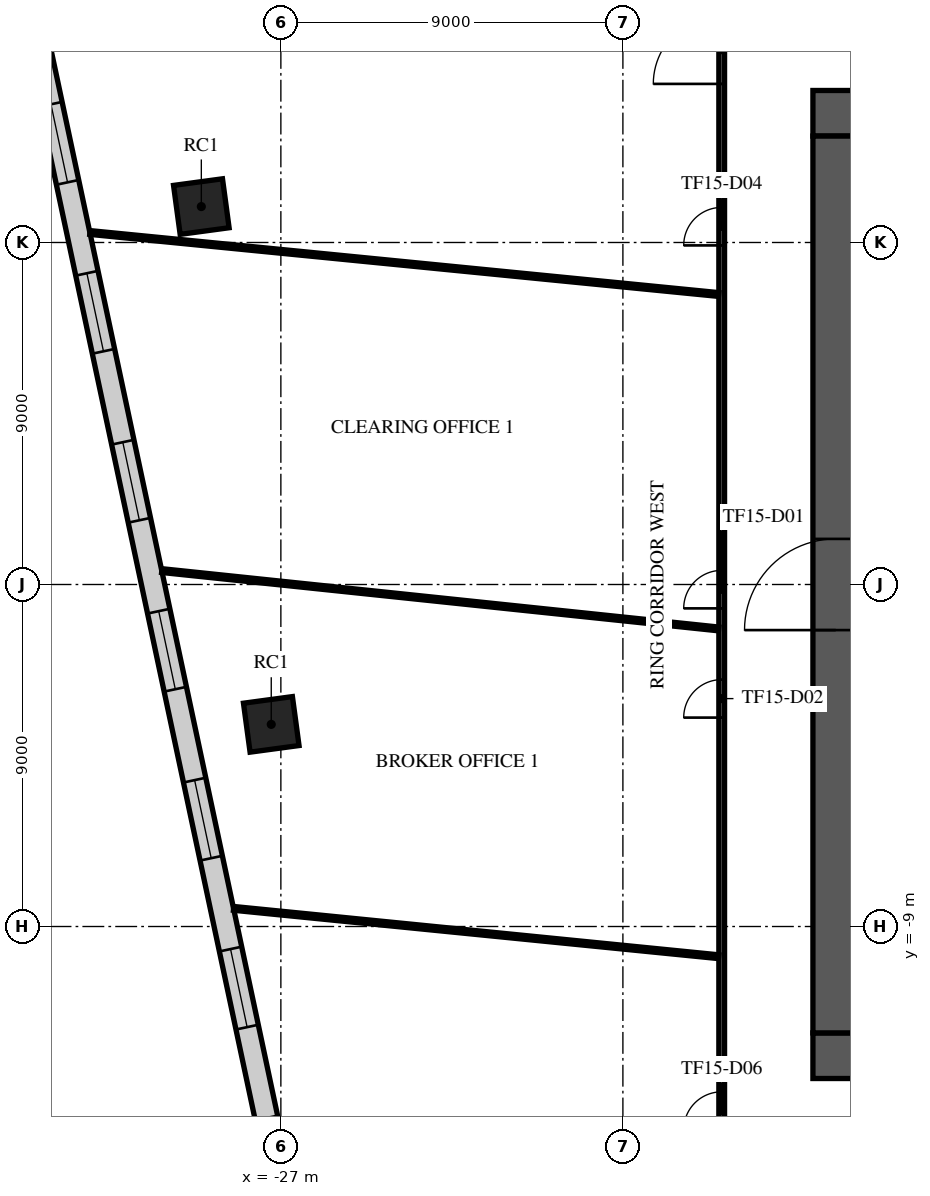
"""IFC4 building model, lengths in metres.
Left out: names, types, materials, properties, quantities, classifications, styles, units other than length and angle.
Written with IfcOpenShell. Run it as: python <this file> out.ifc"""

import sys

from ifc_helpers import new_model, si_unit, direction, frame, frame_2d, origin, origin_2d, place, context, subcontext, project, spatial, rectangle, extrude, element, fill, save


model = new_model("IFC4")
c1 = context("Model", 3, precision=1e-05, world=origin(), true_north=direction((0.0, 1.0)))
c2 = subcontext(c1, "Body", "Model", "MODEL_VIEW")
j1 = project(units=[si_unit("LENGTHUNIT", "METRE"), si_unit("PLANEANGLEUNIT", "RADIAN")], contexts=[c1])
p1 = place(None, origin())
s1 = spatial("IfcSite", under=j1, at=p1, CompositionType="ELEMENT")
p2 = place(p1, origin())
s2 = spatial("IfcBuilding", under=s1, at=p2, CompositionType="ELEMENT")
p3 = place(p2, frame((0.0, 0.0, 68.1)))
s3 = spatial("IfcBuildingStorey", under=s2, at=p3, CompositionType="ELEMENT", Elevation=68.1)
for number, where, z_axis, x_axis in (
    (1, (-29.093, 9.945, 0.0), (0.0, 0.0, 1.0), (0.991, 0.134, 0.0)),
    (2, (-27.253, -3.681, 0.0), (0.0, 0.0, 1.0), (0.991, 0.134, 0.0)),
):
    element("IfcColumn", number, at=place(p3, frame(where, z_axis=z_axis, x_axis=x_axis)), inside=s3, PredefinedType="COLUMN", context=c2, shape_type="SweptSolid", body=[
        extrude(rectangle(XDim=1.3, YDim=1.3, at=origin_2d()), origin(), (0.0, 0.0, 1.0), 4.2),
    ])
p4 = place(p3, frame((-13.0, 12.4, 0.0), z_axis=(0.0, 0.0, 1.0), x_axis=(1.0, 0.0, 0.0)))
e3 = element("IfcWall", 3, at=p4, inside=s3, PredefinedType="SHEAR", context=c2, shape_type="SweptSolid", body=[
    extrude(rectangle(XDim=26.0, YDim=1.2, at=frame_2d((13.0, 0.0))), origin(), (0.0, 0.0, 1.0), 3.75),
])
p5 = place(p4, frame((11.8, 0.0, 0.0)))
e4 = element("IfcOpeningElement", 4, at=p5, cuts=e3, PredefinedType="OPENING", context=c2, shape_type="SweptSolid", body=[
    extrude(rectangle(XDim=2.4, YDim=2.4, at=frame_2d((1.2, 1.2))), frame((0.0, 0.61, 0.0), z_axis=(0.0, -1.0, 0.0), x_axis=(1.0, 0.0, 0.0)), (0.0, 0.0, 1.0), 1.22),
])
p6 = place(p4, frame((22.625, 0.0, 0.0)))
e5 = element("IfcOpeningElement", 5, at=p6, cuts=e3, PredefinedType="OPENING", context=c2, shape_type="SweptSolid", body=[
    extrude(rectangle(XDim=1.2, YDim=2.1, at=frame_2d((0.6, 1.05))), frame((0.0, 0.61, 0.0), z_axis=(0.0, -1.0, 0.0), x_axis=(1.0, 0.0, 0.0)), (0.0, 0.0, 1.0), 1.22),
])
p7 = place(p4, frame((1.6, 0.0, 0.0)))
e6 = element("IfcOpeningElement", 6, at=p7, cuts=e3, PredefinedType="OPENING", context=c2, shape_type="SweptSolid", body=[
    extrude(rectangle(XDim=1.0, YDim=2.1, at=frame_2d((0.5, 1.05))), frame((0.0, 0.61, 0.0), z_axis=(0.0, -1.0, 0.0), x_axis=(1.0, 0.0, 0.0)), (0.0, 0.0, 1.0), 1.22),
])
p8 = place(p3, frame((-13.0, -12.4, 0.0), z_axis=(0.0, 0.0, 1.0), x_axis=(1.0, 0.0, 0.0)))
e7 = element("IfcWall", 7, at=p8, inside=s3, PredefinedType="SHEAR", context=c2, shape_type="SweptSolid", body=[
    extrude(rectangle(XDim=26.0, YDim=1.2, at=frame_2d((13.0, 0.0))), origin(), (0.0, 0.0, 1.0), 3.75),
])
p9 = place(p8, frame((7.9, 0.0, 0.0)))
e8 = element("IfcOpeningElement", 8, at=p9, cuts=e7, PredefinedType="OPENING", context=c2, shape_type="SweptSolid", body=[
    extrude(rectangle(XDim=2.0, YDim=2.1, at=frame_2d((1.0, 1.05))), frame((0.0, 0.61, 0.0), z_axis=(0.0, -1.0, 0.0), x_axis=(1.0, 0.0, 0.0)), (0.0, 0.0, 1.0), 1.22),
])
p10 = place(p8, frame((18.025, 0.0, 0.0)))
e9 = element("IfcOpeningElement", 9, at=p10, cuts=e7, PredefinedType="OPENING", context=c2, shape_type="SweptSolid", body=[
    extrude(rectangle(XDim=1.2, YDim=2.1, at=frame_2d((0.6, 1.05))), frame((0.0, 0.61, 0.0), z_axis=(0.0, -1.0, 0.0), x_axis=(1.0, 0.0, 0.0)), (0.0, 0.0, 1.0), 1.22),
])
p11 = place(p8, frame((2.175, 0.0, 0.0)))
e10 = element("IfcOpeningElement", 10, at=p11, cuts=e7, PredefinedType="OPENING", context=c2, shape_type="SweptSolid", body=[
    extrude(rectangle(XDim=1.2, YDim=2.1, at=frame_2d((0.6, 1.05))), frame((0.0, 0.61, 0.0), z_axis=(0.0, -1.0, 0.0), x_axis=(1.0, 0.0, 0.0)), (0.0, 0.0, 1.0), 1.22),
])
p12 = place(p8, frame((22.625, 0.0, 0.0)))
e11 = element("IfcOpeningElement", 11, at=p12, cuts=e7, PredefinedType="OPENING", context=c2, shape_type="SweptSolid", body=[
    extrude(rectangle(XDim=1.2, YDim=2.1, at=frame_2d((0.6, 1.05))), frame((0.0, 0.61, 0.0), z_axis=(0.0, -1.0, 0.0), x_axis=(1.0, 0.0, 0.0)), (0.0, 0.0, 1.0), 1.22),
])
p13 = place(p3, frame((-12.4, -11.8, 0.0), z_axis=(0.0, 0.0, 1.0), x_axis=(0.0, 1.0, 0.0)))
e12 = element("IfcWall", 12, at=p13, inside=s3, PredefinedType="SHEAR", context=c2, shape_type="SweptSolid", body=[
    extrude(rectangle(XDim=23.6, YDim=1.2, at=frame_2d((11.8, 0.0))), origin(), (0.0, 0.0, 1.0), 3.75),
])
p14 = place(p13, frame((10.6, 0.0, 0.0)))
e13 = element("IfcOpeningElement", 13, at=p14, cuts=e12, PredefinedType="OPENING", context=c2, shape_type="SweptSolid", body=[
    extrude(rectangle(XDim=2.4, YDim=2.4, at=frame_2d((1.2, 1.2))), frame((0.0, 0.61, 0.0), z_axis=(0.0, -1.0, 0.0), x_axis=(1.0, 0.0, 0.0)), (0.0, 0.0, 1.0), 1.22),
])
p15 = place(p3, frame((-34.223, 18.157, 0.0), z_axis=(0.0, 0.0, 1.0), x_axis=(0.207913160934, -0.97814728825, 0.0)))
e14 = element("IfcWall", 14, at=p15, inside=s3, PredefinedType="STANDARD", context=c2, shape_type="SweptSolid", body=[
    extrude(rectangle(XDim=49.751, YDim=0.6, at=frame_2d((24.876, 0.0))), origin(), (0.0, 0.0, 1.0), 3.75),
])
p16 = place(p15, frame((1.161, 0.0, 0.9)))
e15 = element("IfcOpeningElement", 15, at=p16, cuts=e14, PredefinedType="OPENING", context=c2, shape_type="SweptSolid", body=[
    extrude(rectangle(XDim=2.1, YDim=2.1, at=frame_2d((1.05, 1.05))), frame((0.0, 0.31, 0.0), z_axis=(0.0, -1.0, 0.0), x_axis=(1.0, 0.0, 0.0)), (0.0, 0.0, 1.0), 0.62),
])
p17 = place(p15, frame((5.644, 0.0, 0.9)))
e16 = element("IfcOpeningElement", 16, at=p17, cuts=e14, PredefinedType="OPENING", context=c2, shape_type="SweptSolid", body=[
    extrude(rectangle(XDim=2.1, YDim=2.1, at=frame_2d((1.05, 1.05))), frame((0.0, 0.31, 0.0), z_axis=(0.0, -1.0, 0.0), x_axis=(1.0, 0.0, 0.0)), (0.0, 0.0, 1.0), 0.62),
])
p18 = place(p15, frame((10.189, 0.0, 0.9)))
e17 = element("IfcOpeningElement", 17, at=p18, cuts=e14, PredefinedType="OPENING", context=c2, shape_type="SweptSolid", body=[
    extrude(rectangle(XDim=2.1, YDim=2.1, at=frame_2d((1.05, 1.05))), frame((0.0, 0.31, 0.0), z_axis=(0.0, -1.0, 0.0), x_axis=(1.0, 0.0, 0.0)), (0.0, 0.0, 1.0), 0.62),
])
p19 = place(p15, frame((14.735, 0.0, 0.9)))
e18 = element("IfcOpeningElement", 18, at=p19, cuts=e14, PredefinedType="OPENING", context=c2, shape_type="SweptSolid", body=[
    extrude(rectangle(XDim=2.1, YDim=2.1, at=frame_2d((1.05, 1.05))), frame((0.0, 0.31, 0.0), z_axis=(0.0, -1.0, 0.0), x_axis=(1.0, 0.0, 0.0)), (0.0, 0.0, 1.0), 0.62),
])
p20 = place(p15, frame((19.28, 0.0, 0.9)))
e19 = element("IfcOpeningElement", 19, at=p20, cuts=e14, PredefinedType="OPENING", context=c2, shape_type="SweptSolid", body=[
    extrude(rectangle(XDim=2.1, YDim=2.1, at=frame_2d((1.05, 1.05))), frame((0.0, 0.31, 0.0), z_axis=(0.0, -1.0, 0.0), x_axis=(1.0, 0.0, 0.0)), (0.0, 0.0, 1.0), 0.62),
])
p21 = place(p15, frame((23.826, 0.0, 0.9)))
e20 = element("IfcOpeningElement", 20, at=p21, cuts=e14, PredefinedType="OPENING", context=c2, shape_type="SweptSolid", body=[
    extrude(rectangle(XDim=2.1, YDim=2.1, at=frame_2d((1.05, 1.05))), frame((0.0, 0.31, 0.0), z_axis=(0.0, -1.0, 0.0), x_axis=(1.0, 0.0, 0.0)), (0.0, 0.0, 1.0), 0.62),
])
p22 = place(p15, frame((28.371, 0.0, 0.9)))
e21 = element("IfcOpeningElement", 21, at=p22, cuts=e14, PredefinedType="OPENING", context=c2, shape_type="SweptSolid", body=[
    extrude(rectangle(XDim=2.1, YDim=2.1, at=frame_2d((1.05, 1.05))), frame((0.0, 0.31, 0.0), z_axis=(0.0, -1.0, 0.0), x_axis=(1.0, 0.0, 0.0)), (0.0, 0.0, 1.0), 0.62),
])
p23 = place(p15, frame((32.917, 0.0, 0.9)))
e22 = element("IfcOpeningElement", 22, at=p23, cuts=e14, PredefinedType="OPENING", context=c2, shape_type="SweptSolid", body=[
    extrude(rectangle(XDim=2.1, YDim=2.1, at=frame_2d((1.05, 1.05))), frame((0.0, 0.31, 0.0), z_axis=(0.0, -1.0, 0.0), x_axis=(1.0, 0.0, 0.0)), (0.0, 0.0, 1.0), 0.62),
])
p24 = place(p15, frame((37.462, 0.0, 0.9)))
e23 = element("IfcOpeningElement", 23, at=p24, cuts=e14, PredefinedType="OPENING", context=c2, shape_type="SweptSolid", body=[
    extrude(rectangle(XDim=2.1, YDim=2.1, at=frame_2d((1.05, 1.05))), frame((0.0, 0.31, 0.0), z_axis=(0.0, -1.0, 0.0), x_axis=(1.0, 0.0, 0.0)), (0.0, 0.0, 1.0), 0.62),
])
p25 = place(p15, frame((42.008, 0.0, 0.9)))
e24 = element("IfcOpeningElement", 24, at=p25, cuts=e14, PredefinedType="OPENING", context=c2, shape_type="SweptSolid", body=[
    extrude(rectangle(XDim=2.1, YDim=2.1, at=frame_2d((1.05, 1.05))), frame((0.0, 0.31, 0.0), z_axis=(0.0, -1.0, 0.0), x_axis=(1.0, 0.0, 0.0)), (0.0, 0.0, 1.0), 0.62),
])
p26 = place(p15, frame((46.491, 0.0, 0.9)))
e25 = element("IfcOpeningElement", 25, at=p26, cuts=e14, PredefinedType="OPENING", context=c2, shape_type="SweptSolid", body=[
    extrude(rectangle(XDim=2.1, YDim=2.1, at=frame_2d((1.05, 1.05))), frame((0.0, 0.31, 0.0), z_axis=(0.0, -1.0, 0.0), x_axis=(1.0, 0.0, 0.0)), (0.0, 0.0, 1.0), 0.62),
])
p27 = place(p3, frame((-15.4, -15.4, 0.0), z_axis=(0.0, 0.0, 1.0), x_axis=(0.0, 1.0, 0.0)))
e26 = element("IfcWall", 26, at=p27, inside=s3, PredefinedType="PARTITIONING", context=c2, shape_type="SweptSolid", body=[
    extrude(rectangle(XDim=30.8, YDim=0.15, at=frame_2d((15.4, 0.0))), origin(), (0.0, 0.0, 1.0), 3.25),
])
p28 = place(p27, frame((14.771, 0.0, 0.0)))
e27 = element("IfcOpeningElement", 27, at=p28, cuts=e26, PredefinedType="OPENING", context=c2, shape_type="SweptSolid", body=[
    extrude(rectangle(XDim=1.0, YDim=2.1, at=frame_2d((0.5, 1.05))), frame((0.0, 0.085, 0.0), z_axis=(0.0, -1.0, 0.0), x_axis=(1.0, 0.0, 0.0)), (0.0, 0.0, 1.0), 0.17),
])
p29 = place(p27, frame((11.897, 0.0, 0.0)))
e28 = element("IfcOpeningElement", 28, at=p29, cuts=e26, PredefinedType="OPENING", context=c2, shape_type="SweptSolid", body=[
    extrude(rectangle(XDim=1.0, YDim=2.1, at=frame_2d((0.5, 1.05))), frame((0.0, 0.085, 0.0), z_axis=(0.0, -1.0, 0.0), x_axis=(1.0, 0.0, 0.0)), (0.0, 0.0, 1.0), 0.17),
])
p30 = place(p27, frame((28.573, 0.0, 0.0)))
e29 = element("IfcOpeningElement", 29, at=p30, cuts=e26, PredefinedType="OPENING", context=c2, shape_type="SweptSolid", body=[
    extrude(rectangle(XDim=1.8, YDim=2.1, at=frame_2d((0.9, 1.05))), frame((0.0, 0.085, 0.0), z_axis=(0.0, -1.0, 0.0), x_axis=(1.0, 0.0, 0.0)), (0.0, 0.0, 1.0), 0.17),
])
p31 = place(p27, frame((24.323, 0.0, 0.0)))
e30 = element("IfcOpeningElement", 30, at=p31, cuts=e26, PredefinedType="OPENING", context=c2, shape_type="SweptSolid", body=[
    extrude(rectangle(XDim=1.0, YDim=2.1, at=frame_2d((0.5, 1.05))), frame((0.0, 0.085, 0.0), z_axis=(0.0, -1.0, 0.0), x_axis=(1.0, 0.0, 0.0)), (0.0, 0.0, 1.0), 0.17),
])
p32 = place(p27, frame((1.05, 0.0, 0.0)))
e31 = element("IfcOpeningElement", 31, at=p32, cuts=e26, PredefinedType="OPENING", context=c2, shape_type="SweptSolid", body=[
    extrude(rectangle(XDim=1.0, YDim=2.1, at=frame_2d((0.5, 1.05))), frame((0.0, 0.085, 0.0), z_axis=(0.0, -1.0, 0.0), x_axis=(1.0, 0.0, 0.0)), (0.0, 0.0, 1.0), 0.17),
])
p33 = place(p3, frame((-32.024, 9.263, 0.0), z_axis=(0.0, 0.0, 1.0), x_axis=(0.995169060452, -0.098176072032, 0.0)))
e32 = element("IfcWall", 32, at=p33, inside=s3, PredefinedType="PARTITIONING", context=c2, shape_type="SweptSolid", body=[
    extrude(rectangle(XDim=16.624, YDim=0.1, at=frame_2d((8.312, 0.0))), origin(), (0.0, 0.0, 1.0), 2.95),
])
p34 = place(p3, frame((-30.133, 0.366, 0.0), z_axis=(0.0, 0.0, 1.0), x_axis=(0.994552749897, -0.104234484085, 0.0)))
e33 = element("IfcWall", 33, at=p34, inside=s3, PredefinedType="PARTITIONING", context=c2, shape_type="SweptSolid", body=[
    extrude(rectangle(XDim=14.733, YDim=0.1, at=frame_2d((7.366, 0.0))), origin(), (0.0, 0.0, 1.0), 2.95),
])
p35 = place(p3, frame((-28.243, -8.523, 0.0), z_axis=(0.0, 0.0, 1.0), x_axis=(0.995068800652, -0.099187105861, 0.0)))
e34 = element("IfcWall", 34, at=p35, inside=s3, PredefinedType="PARTITIONING", context=c2, shape_type="SweptSolid", body=[
    extrude(rectangle(XDim=12.826, YDim=0.1, at=frame_2d((6.413, 0.0))), origin(), (0.0, 0.0, 1.0), 2.95),
])
p36 = place(p14, origin())
e35 = element("IfcDoor", 35, at=p36, inside=s3, OperationType="SINGLE_SWING_LEFT", PredefinedType="DOOR", context=c2, shape_type="SweptSolid", body=[
    extrude(rectangle(XDim=2.4, YDim=2.4, at=frame_2d((1.2, 1.2))), frame((0.0, 0.025, 0.0), z_axis=(0.0, -1.0, 0.0), x_axis=(1.0, 0.0, 0.0)), (0.0, 0.0, 1.0), 0.05),
])
fill(e13, e35)
p37 = place(p17, origin())
e36 = element("IfcWindow", 36, at=p37, inside=s3, PartitioningType="SINGLE_PANEL", PredefinedType="WINDOW", context=c2, shape_type="SweptSolid", body=[
    extrude(rectangle(XDim=2.1, YDim=2.1, at=frame_2d((1.05, 1.05))), frame((0.0, 0.03, 0.0), z_axis=(0.0, -1.0, 0.0), x_axis=(1.0, 0.0, 0.0)), (0.0, 0.0, 1.0), 0.06),
])
fill(e16, e36)
p38 = place(p18, origin())
e37 = element("IfcWindow", 37, at=p38, inside=s3, PartitioningType="SINGLE_PANEL", PredefinedType="WINDOW", context=c2, shape_type="SweptSolid", body=[
    extrude(rectangle(XDim=2.1, YDim=2.1, at=frame_2d((1.05, 1.05))), frame((0.0, 0.03, 0.0), z_axis=(0.0, -1.0, 0.0), x_axis=(1.0, 0.0, 0.0)), (0.0, 0.0, 1.0), 0.06),
])
fill(e17, e37)
p39 = place(p19, origin())
e38 = element("IfcWindow", 38, at=p39, inside=s3, PartitioningType="SINGLE_PANEL", PredefinedType="WINDOW", context=c2, shape_type="SweptSolid", body=[
    extrude(rectangle(XDim=2.1, YDim=2.1, at=frame_2d((1.05, 1.05))), frame((0.0, 0.03, 0.0), z_axis=(0.0, -1.0, 0.0), x_axis=(1.0, 0.0, 0.0)), (0.0, 0.0, 1.0), 0.06),
])
fill(e18, e38)
p40 = place(p20, origin())
e39 = element("IfcWindow", 39, at=p40, inside=s3, PartitioningType="SINGLE_PANEL", PredefinedType="WINDOW", context=c2, shape_type="SweptSolid", body=[
    extrude(rectangle(XDim=2.1, YDim=2.1, at=frame_2d((1.05, 1.05))), frame((0.0, 0.03, 0.0), z_axis=(0.0, -1.0, 0.0), x_axis=(1.0, 0.0, 0.0)), (0.0, 0.0, 1.0), 0.06),
])
fill(e19, e39)
p41 = place(p21, origin())
e40 = element("IfcWindow", 40, at=p41, inside=s3, PartitioningType="SINGLE_PANEL", PredefinedType="WINDOW", context=c2, shape_type="SweptSolid", body=[
    extrude(rectangle(XDim=2.1, YDim=2.1, at=frame_2d((1.05, 1.05))), frame((0.0, 0.03, 0.0), z_axis=(0.0, -1.0, 0.0), x_axis=(1.0, 0.0, 0.0)), (0.0, 0.0, 1.0), 0.06),
])
fill(e20, e40)
p42 = place(p22, origin())
e41 = element("IfcWindow", 41, at=p42, inside=s3, PartitioningType="SINGLE_PANEL", PredefinedType="WINDOW", context=c2, shape_type="SweptSolid", body=[
    extrude(rectangle(XDim=2.1, YDim=2.1, at=frame_2d((1.05, 1.05))), frame((0.0, 0.03, 0.0), z_axis=(0.0, -1.0, 0.0), x_axis=(1.0, 0.0, 0.0)), (0.0, 0.0, 1.0), 0.06),
])
fill(e21, e41)
p43 = place(p28, origin())
e42 = element("IfcDoor", 42, at=p43, inside=s3, OperationType="SINGLE_SWING_RIGHT", PredefinedType="DOOR", context=c2, shape_type="SweptSolid", body=[
    extrude(rectangle(XDim=1.0, YDim=2.1, at=frame_2d((0.5, 1.05))), frame((0.0, 0.025, 0.0), z_axis=(0.0, -1.0, 0.0), x_axis=(1.0, 0.0, 0.0)), (0.0, 0.0, 1.0), 0.05),
])
fill(e27, e42)
p44 = place(p29, origin())
e43 = element("IfcDoor", 43, at=p44, inside=s3, OperationType="SINGLE_SWING_RIGHT", PredefinedType="DOOR", context=c2, shape_type="SweptSolid", body=[
    extrude(rectangle(XDim=1.0, YDim=2.1, at=frame_2d((0.5, 1.05))), frame((0.0, 0.025, 0.0), z_axis=(0.0, -1.0, 0.0), x_axis=(1.0, 0.0, 0.0)), (0.0, 0.0, 1.0), 0.05),
])
fill(e28, e43)
p45 = place(p30, origin())
e44 = element("IfcDoor", 44, at=p45, inside=s3, OperationType="DOUBLE_DOOR_SINGLE_SWING", PredefinedType="DOOR", context=c2, shape_type="SweptSolid", body=[
    extrude(rectangle(XDim=1.8, YDim=2.1, at=frame_2d((0.9, 1.05))), frame((0.0, 0.025, 0.0), z_axis=(0.0, -1.0, 0.0), x_axis=(1.0, 0.0, 0.0)), (0.0, 0.0, 1.0), 0.05),
])
fill(e29, e44)
p46 = place(p31, origin())
e45 = element("IfcDoor", 45, at=p46, inside=s3, OperationType="SINGLE_SWING_LEFT", PredefinedType="DOOR", context=c2, shape_type="SweptSolid", body=[
    extrude(rectangle(XDim=1.0, YDim=2.1, at=frame_2d((0.5, 1.05))), frame((0.0, 0.025, 0.0), z_axis=(0.0, -1.0, 0.0), x_axis=(1.0, 0.0, 0.0)), (0.0, 0.0, 1.0), 0.05),
])
fill(e30, e45)
p47 = place(p32, origin())
e46 = element("IfcDoor", 46, at=p47, inside=s3, OperationType="SINGLE_SWING_RIGHT", PredefinedType="DOOR", context=c2, shape_type="SweptSolid", body=[
    extrude(rectangle(XDim=1.0, YDim=2.1, at=frame_2d((0.5, 1.05))), frame((0.0, 0.025, 0.0), z_axis=(0.0, -1.0, 0.0), x_axis=(1.0, 0.0, 0.0)), (0.0, 0.0, 1.0), 0.05),
])
fill(e31, e46)
save(model, sys.argv[1])
